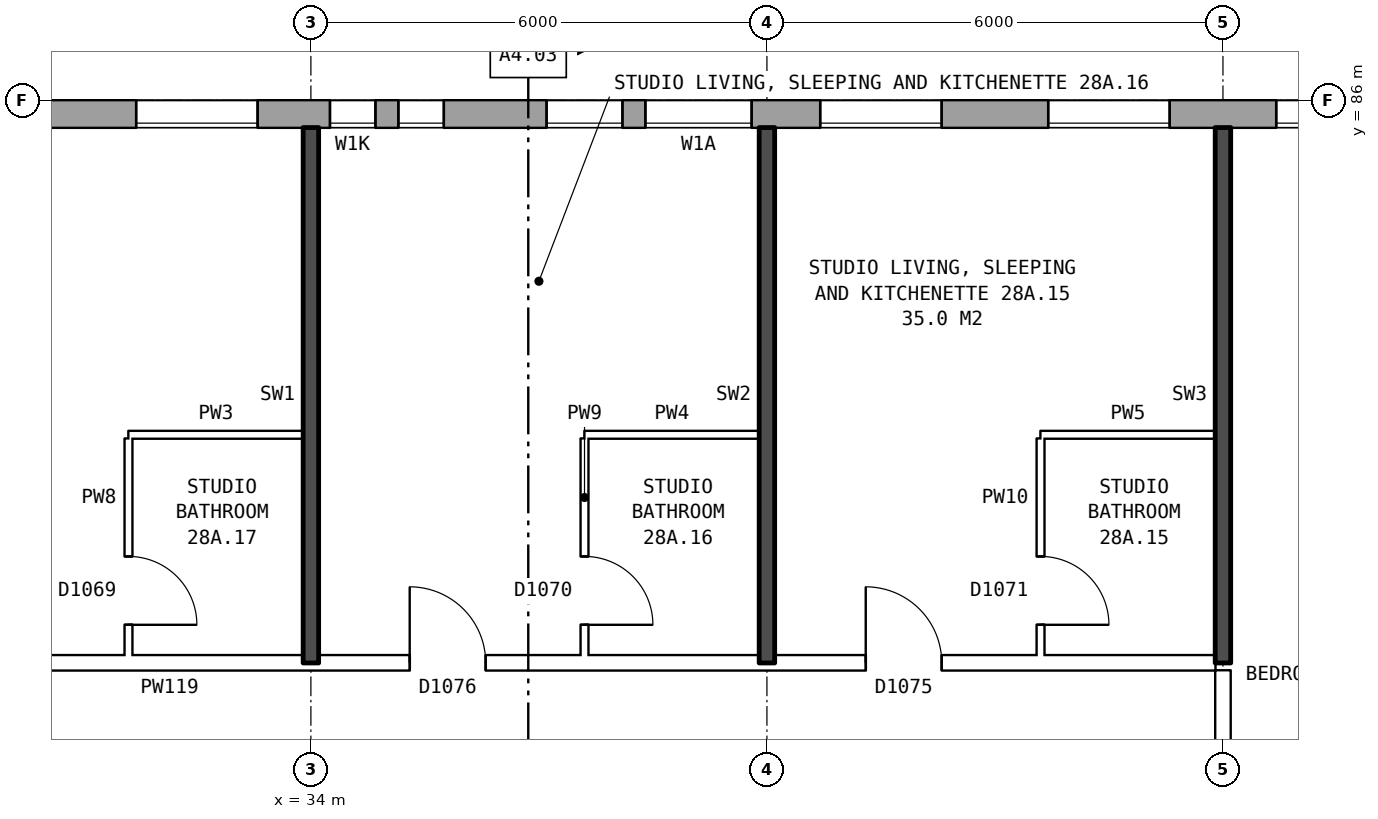
"""IFC4 building model, lengths in metres.
Left out: names, types, materials, properties, quantities, classifications, styles, units other than length and angle.
Written with IfcOpenShell. Run it as: python <this file> out.ifc"""

import sys

from ifc_helpers import new_model, si_unit, direction, frame, frame_2d, origin, place, context, subcontext, project, spatial, rectangle, extrude, element, fill, save


model = new_model("IFC4")
c1 = context("Model", 3, precision=1e-05, world=origin(), true_north=direction((0.0, 1.0)))
c2 = subcontext(c1, "Body", "Model", "MODEL_VIEW")
j1 = project(units=[si_unit("LENGTHUNIT", "METRE"), si_unit("PLANEANGLEUNIT", "RADIAN")], contexts=[c1])
p1 = place(None, origin())
s1 = spatial("IfcSite", under=j1, at=p1, CompositionType="ELEMENT")
p2 = place(p1, origin())
s2 = spatial("IfcBuilding", under=s1, at=p2, CompositionType="ELEMENT")
p3 = place(p2, frame((0.0, 0.0, 102.6)))
s3 = spatial("IfcBuildingStorey", under=s2, at=p3, CompositionType="ELEMENT", Elevation=102.6)
p4 = place(p3, frame((72.925, 85.82, 0.0), z_axis=(0.0, 0.0, 1.0), x_axis=(-1.0, 0.0, 0.0)))
e1 = element("IfcWall", 1, at=p4, inside=s3, PredefinedType="STANDARD", context=c2, shape_type="SweptSolid", body=[
    extrude(rectangle(XDim=44.851, YDim=0.36, at=frame_2d((22.425, 0.0))), origin(), (0.0, 0.0, 1.0), 2.85),
])
p5 = place(p4, frame((0.625, 0.0, 0.8)))
e2 = element("IfcOpeningElement", 2, at=p5, cuts=e1, PredefinedType="OPENING", context=c2, shape_type="SweptSolid", body=[
    extrude(rectangle(XDim=1.6, YDim=1.8, at=frame_2d((0.8, 0.9))), frame((0.0, 0.19, 0.0), z_axis=(0.0, -1.0, 0.0), x_axis=(1.0, 0.0, 0.0)), (0.0, 0.0, 1.0), 0.38),
])
p6 = place(p4, frame((3.625, 0.0, 0.8)))
e3 = element("IfcOpeningElement", 3, at=p6, cuts=e1, PredefinedType="OPENING", context=c2, shape_type="SweptSolid", body=[
    extrude(rectangle(XDim=1.6, YDim=1.8, at=frame_2d((0.8, 0.9))), frame((0.0, 0.19, 0.0), z_axis=(0.0, -1.0, 0.0), x_axis=(1.0, 0.0, 0.0)), (0.0, 0.0, 1.0), 0.38),
])
p7 = place(p4, frame((5.525, 0.0, 0.8)))
e4 = element("IfcOpeningElement", 4, at=p7, cuts=e1, PredefinedType="OPENING", context=c2, shape_type="SweptSolid", body=[
    extrude(rectangle(XDim=0.8, YDim=1.8, at=frame_2d((0.4, 0.9))), frame((0.0, 0.19, 0.0), z_axis=(0.0, -1.0, 0.0), x_axis=(1.0, 0.0, 0.0)), (0.0, 0.0, 1.0), 0.38),
])
p8 = place(p4, frame((9.125, 0.0, 0.8)))
e5 = element("IfcOpeningElement", 5, at=p8, cuts=e1, PredefinedType="OPENING", context=c2, shape_type="SweptSolid", body=[
    extrude(rectangle(XDim=0.6, YDim=0.9, at=frame_2d((0.3, 0.45))), frame((0.0, 0.19, 0.0), z_axis=(0.0, -1.0, 0.0), x_axis=(1.0, 0.0, 0.0)), (0.0, 0.0, 1.0), 0.38),
])
p9 = place(p4, frame((12.625, 0.0, 0.8)))
e6 = element("IfcOpeningElement", 6, at=p9, cuts=e1, PredefinedType="OPENING", context=c2, shape_type="SweptSolid", body=[
    extrude(rectangle(XDim=1.6, YDim=1.8, at=frame_2d((0.8, 0.9))), frame((0.0, 0.19, 0.0), z_axis=(0.0, -1.0, 0.0), x_axis=(1.0, 0.0, 0.0)), (0.0, 0.0, 1.0), 0.38),
])
p10 = place(p4, frame((15.625, 0.0, 0.8)))
e7 = element("IfcOpeningElement", 7, at=p10, cuts=e1, PredefinedType="OPENING", context=c2, shape_type="SweptSolid", body=[
    extrude(rectangle(XDim=1.6, YDim=1.8, at=frame_2d((0.8, 0.9))), frame((0.0, 0.19, 0.0), z_axis=(0.0, -1.0, 0.0), x_axis=(1.0, 0.0, 0.0)), (0.0, 0.0, 1.0), 0.38),
])
p11 = place(p4, frame((18.625, 0.0, 0.8)))
e8 = element("IfcOpeningElement", 8, at=p11, cuts=e1, PredefinedType="OPENING", context=c2, shape_type="SweptSolid", body=[
    extrude(rectangle(XDim=1.6, YDim=1.8, at=frame_2d((0.8, 0.9))), frame((0.0, 0.19, 0.0), z_axis=(0.0, -1.0, 0.0), x_axis=(1.0, 0.0, 0.0)), (0.0, 0.0, 1.0), 0.38),
])
p12 = place(p4, frame((21.625, 0.0, 0.8)))
e9 = element("IfcOpeningElement", 9, at=p12, cuts=e1, PredefinedType="OPENING", context=c2, shape_type="SweptSolid", body=[
    extrude(rectangle(XDim=1.6, YDim=1.8, at=frame_2d((0.8, 0.9))), frame((0.0, 0.19, 0.0), z_axis=(0.0, -1.0, 0.0), x_axis=(1.0, 0.0, 0.0)), (0.0, 0.0, 1.0), 0.38),
])
p13 = place(p4, frame((24.625, 0.0, 0.8)))
e10 = element("IfcOpeningElement", 10, at=p13, cuts=e1, PredefinedType="OPENING", context=c2, shape_type="SweptSolid", body=[
    extrude(rectangle(XDim=1.6, YDim=1.8, at=frame_2d((0.8, 0.9))), frame((0.0, 0.19, 0.0), z_axis=(0.0, -1.0, 0.0), x_axis=(1.0, 0.0, 0.0)), (0.0, 0.0, 1.0), 0.38),
])
p14 = place(p4, frame((27.625, 0.0, 0.8)))
e11 = element("IfcOpeningElement", 11, at=p14, cuts=e1, PredefinedType="OPENING", context=c2, shape_type="SweptSolid", body=[
    extrude(rectangle(XDim=1.6, YDim=1.8, at=frame_2d((0.8, 0.9))), frame((0.0, 0.19, 0.0), z_axis=(0.0, -1.0, 0.0), x_axis=(1.0, 0.0, 0.0)), (0.0, 0.0, 1.0), 0.38),
])
p15 = place(p4, frame((30.625, 0.0, 0.8)))
e12 = element("IfcOpeningElement", 12, at=p15, cuts=e1, PredefinedType="OPENING", context=c2, shape_type="SweptSolid", body=[
    extrude(rectangle(XDim=1.6, YDim=1.8, at=frame_2d((0.8, 0.9))), frame((0.0, 0.19, 0.0), z_axis=(0.0, -1.0, 0.0), x_axis=(1.0, 0.0, 0.0)), (0.0, 0.0, 1.0), 0.38),
])
p16 = place(p4, frame((33.125, 0.0, 0.8)))
e13 = element("IfcOpeningElement", 13, at=p16, cuts=e1, PredefinedType="OPENING", context=c2, shape_type="SweptSolid", body=[
    extrude(rectangle(XDim=1.4, YDim=1.8, at=frame_2d((0.7, 0.9))), frame((0.0, 0.19, 0.0), z_axis=(0.0, -1.0, 0.0), x_axis=(1.0, 0.0, 0.0)), (0.0, 0.0, 1.0), 0.38),
])
p17 = place(p4, frame((34.825, 0.0, 0.8)))
e14 = element("IfcOpeningElement", 14, at=p17, cuts=e1, PredefinedType="OPENING", context=c2, shape_type="SweptSolid", body=[
    extrude(rectangle(XDim=1.0, YDim=0.9, at=frame_2d((0.5, 0.45))), frame((0.0, 0.19, 0.0), z_axis=(0.0, -1.0, 0.0), x_axis=(1.0, 0.0, 0.0)), (0.0, 0.0, 1.0), 0.38),
])
p18 = place(p4, frame((39.625, 0.0, 0.8)))
e15 = element("IfcOpeningElement", 15, at=p18, cuts=e1, PredefinedType="OPENING", context=c2, shape_type="SweptSolid", body=[
    extrude(rectangle(XDim=1.6, YDim=1.8, at=frame_2d((0.8, 0.9))), frame((0.0, 0.19, 0.0), z_axis=(0.0, -1.0, 0.0), x_axis=(1.0, 0.0, 0.0)), (0.0, 0.0, 1.0), 0.38),
])
p19 = place(p4, frame((42.625, 0.0, 0.8)))
e16 = element("IfcOpeningElement", 16, at=p19, cuts=e1, PredefinedType="OPENING", context=c2, shape_type="SweptSolid", body=[
    extrude(rectangle(XDim=1.6, YDim=1.8, at=frame_2d((0.8, 0.9))), frame((0.0, 0.19, 0.0), z_axis=(0.0, -1.0, 0.0), x_axis=(1.0, 0.0, 0.0)), (0.0, 0.0, 1.0), 0.38),
])
p20 = place(p4, frame((6.625, 0.0, 1.7)))
e17 = element("IfcOpeningElement", 17, at=p20, cuts=e1, PredefinedType="OPENING", context=c2, shape_type="SweptSolid", body=[
    extrude(rectangle(XDim=1.0, YDim=0.9, at=frame_2d((0.5, 0.45))), frame((0.0, 0.19, 0.0), z_axis=(0.0, -1.0, 0.0), x_axis=(1.0, 0.0, 0.0)), (0.0, 0.0, 1.0), 0.38),
])
p21 = place(p4, frame((10.175, 0.0, 0.8)))
e18 = element("IfcOpeningElement", 18, at=p21, cuts=e1, PredefinedType="OPENING", context=c2, shape_type="SweptSolid", body=[
    extrude(rectangle(XDim=1.6, YDim=1.8, at=frame_2d((0.8, 0.9))), frame((0.0, 0.19, 0.0), z_axis=(0.0, -1.0, 0.0), x_axis=(1.0, 0.0, 0.0)), (0.0, 0.0, 1.0), 0.38),
])
p22 = place(p4, frame((37.175, 0.0, 1.7)))
e19 = element("IfcOpeningElement", 19, at=p22, cuts=e1, PredefinedType="OPENING", context=c2, shape_type="SweptSolid", body=[
    extrude(rectangle(XDim=0.6, YDim=0.9, at=frame_2d((0.3, 0.45))), frame((0.0, 0.19, 0.0), z_axis=(0.0, -1.0, 0.0), x_axis=(1.0, 0.0, 0.0)), (0.0, 0.0, 1.0), 0.38),
])
p23 = place(p4, frame((38.075, 0.0, 1.1)))
e20 = element("IfcOpeningElement", 20, at=p23, cuts=e1, PredefinedType="OPENING", context=c2, shape_type="SweptSolid", body=[
    extrude(rectangle(XDim=0.6, YDim=1.5, at=frame_2d((0.3, 0.75))), frame((0.0, 0.19, 0.0), z_axis=(0.0, -1.0, 0.0), x_axis=(1.0, 0.0, 0.0)), (0.0, 0.0, 1.0), 0.38),
])
p24 = place(p3, frame((25.36, 78.6, 0.0), z_axis=(0.0, 0.0, 1.0), x_axis=(1.0, 0.0, 0.0)))
e21 = element("IfcWall", 21, at=p24, inside=s3, PredefinedType="PARTITIONING", context=c2, shape_type="SweptSolid", body=[
    extrude(rectangle(XDim=20.54, YDim=0.2, at=frame_2d((10.27, 0.0))), origin(), (0.0, 0.0, 1.0), 2.85),
])
p25 = place(p24, frame((15.94, 0.0, 0.0)))
e22 = element("IfcOpeningElement", 22, at=p25, cuts=e21, PredefinedType="OPENING", context=c2, shape_type="SweptSolid", body=[
    extrude(rectangle(XDim=1.0, YDim=2.1, at=frame_2d((0.5, 1.05))), frame((0.0, 0.11, 0.0), z_axis=(0.0, -1.0, 0.0), x_axis=(1.0, 0.0, 0.0)), (0.0, 0.0, 1.0), 0.22),
])
p26 = place(p24, frame((9.94, 0.0, 0.0)))
e23 = element("IfcOpeningElement", 23, at=p26, cuts=e21, PredefinedType="OPENING", context=c2, shape_type="SweptSolid", body=[
    extrude(rectangle(XDim=1.0, YDim=2.1, at=frame_2d((0.5, 1.05))), frame((0.0, 0.11, 0.0), z_axis=(0.0, -1.0, 0.0), x_axis=(1.0, 0.0, 0.0)), (0.0, 0.0, 1.0), 0.22),
])
p27 = place(p24, frame((2.62, 0.0, 0.0)))
e24 = element("IfcOpeningElement", 24, at=p27, cuts=e21, PredefinedType="OPENING", context=c2, shape_type="SweptSolid", body=[
    extrude(rectangle(XDim=1.0, YDim=2.1, at=frame_2d((0.5, 1.05))), frame((0.0, 0.11, 0.0), z_axis=(0.0, -1.0, 0.0), x_axis=(1.0, 0.0, 0.0)), (0.0, 0.0, 1.0), 0.22),
])
for number, where, z_axis, x_axis in (
    (25, (31.6, 81.6, 0.0), (0.0, 0.0, 1.0), (1.0, 0.0, 0.0)),
    (26, (37.6, 81.6, 0.0), (0.0, 0.0, 1.0), (1.0, 0.0, 0.0)),
    (27, (43.6, 81.6, 0.0), (0.0, 0.0, 1.0), (1.0, 0.0, 0.0)),
):
    element("IfcWall", number, at=place(p3, frame(where, z_axis=z_axis, x_axis=x_axis)), inside=s3, PredefinedType="PARTITIONING", context=c2, shape_type="SweptSolid", body=[
        extrude(rectangle(XDim=2.3, YDim=0.1, at=frame_2d((1.15, 0.0))), origin(), (0.0, 0.0, 1.0), 2.85),
    ])
p28 = place(p3, frame((31.6, 78.7, 0.0), z_axis=(0.0, 0.0, 1.0), x_axis=(0.0, 1.0, 0.0)))
e28 = element("IfcWall", 28, at=p28, inside=s3, PredefinedType="PARTITIONING", context=c2, shape_type="SweptSolid", body=[
    extrude(rectangle(XDim=2.85, YDim=0.1, at=frame_2d((1.425, 0.0))), origin(), (0.0, 0.0, 1.0), 2.85),
])
p29 = place(p28, frame((0.4, 0.0, 0.0)))
e29 = element("IfcOpeningElement", 29, at=p29, cuts=e28, PredefinedType="OPENING", context=c2, shape_type="SweptSolid", body=[
    extrude(rectangle(XDim=0.9, YDim=2.1, at=frame_2d((0.45, 1.05))), frame((0.0, 0.06, 0.0), z_axis=(0.0, -1.0, 0.0), x_axis=(1.0, 0.0, 0.0)), (0.0, 0.0, 1.0), 0.12),
])
p30 = place(p3, frame((34.0, 78.6, 0.0), z_axis=(0.0, 0.0, 1.0), x_axis=(0.0, 1.0, 0.0)))
e30 = element("IfcWall", 30, at=p30, inside=s3, PredefinedType="SOLIDWALL", context=c2, shape_type="SweptSolid", body=[
    extrude(rectangle(XDim=7.04, YDim=0.2, at=frame_2d((3.52, 0.0))), origin(), (0.0, 0.0, 1.0), 2.85),
])
p31 = place(p3, frame((37.6, 78.7, 0.0), z_axis=(0.0, 0.0, 1.0), x_axis=(0.0, 1.0, 0.0)))
e31 = element("IfcWall", 31, at=p31, inside=s3, PredefinedType="PARTITIONING", context=c2, shape_type="SweptSolid", body=[
    extrude(rectangle(XDim=2.85, YDim=0.1, at=frame_2d((1.425, 0.0))), origin(), (0.0, 0.0, 1.0), 2.85),
])
p32 = place(p31, frame((0.4, 0.0, 0.0)))
e32 = element("IfcOpeningElement", 32, at=p32, cuts=e31, PredefinedType="OPENING", context=c2, shape_type="SweptSolid", body=[
    extrude(rectangle(XDim=0.9, YDim=2.1, at=frame_2d((0.45, 1.05))), frame((0.0, 0.06, 0.0), z_axis=(0.0, -1.0, 0.0), x_axis=(1.0, 0.0, 0.0)), (0.0, 0.0, 1.0), 0.12),
])
p33 = place(p3, frame((40.0, 78.6, 0.0), z_axis=(0.0, 0.0, 1.0), x_axis=(0.0, 1.0, 0.0)))
e33 = element("IfcWall", 33, at=p33, inside=s3, PredefinedType="SOLIDWALL", context=c2, shape_type="SweptSolid", body=[
    extrude(rectangle(XDim=7.04, YDim=0.2, at=frame_2d((3.52, 0.0))), origin(), (0.0, 0.0, 1.0), 2.85),
])
p34 = place(p3, frame((43.6, 78.7, 0.0), z_axis=(0.0, 0.0, 1.0), x_axis=(0.0, 1.0, 0.0)))
e34 = element("IfcWall", 34, at=p34, inside=s3, PredefinedType="PARTITIONING", context=c2, shape_type="SweptSolid", body=[
    extrude(rectangle(XDim=2.85, YDim=0.1, at=frame_2d((1.425, 0.0))), origin(), (0.0, 0.0, 1.0), 2.85),
])
p35 = place(p34, frame((0.4, 0.0, 0.0)))
e35 = element("IfcOpeningElement", 35, at=p35, cuts=e34, PredefinedType="OPENING", context=c2, shape_type="SweptSolid", body=[
    extrude(rectangle(XDim=0.9, YDim=2.1, at=frame_2d((0.45, 1.05))), frame((0.0, 0.06, 0.0), z_axis=(0.0, -1.0, 0.0), x_axis=(1.0, 0.0, 0.0)), (0.0, 0.0, 1.0), 0.12),
])
p36 = place(p3, frame((46.0, 76.3, 0.0), z_axis=(0.0, 0.0, 1.0), x_axis=(0.0, 1.0, 0.0)))
e36 = element("IfcWall", 36, at=p36, inside=s3, PredefinedType="PARTITIONING", context=c2, shape_type="SweptSolid", body=[
    extrude(rectangle(XDim=2.2, YDim=0.2, at=frame_2d((1.1, 0.0))), origin(), (0.0, 0.0, 1.0), 2.85),
])
p37 = place(p3, frame((46.0, 78.6, 0.0), z_axis=(0.0, 0.0, 1.0), x_axis=(0.0, 1.0, 0.0)))
e37 = element("IfcWall", 37, at=p37, inside=s3, PredefinedType="SOLIDWALL", context=c2, shape_type="SweptSolid", body=[
    extrude(rectangle(XDim=7.04, YDim=0.2, at=frame_2d((3.52, 0.0))), origin(), (0.0, 0.0, 1.0), 2.85),
])
p38 = place(p13, origin())
e38 = element("IfcWindow", 38, at=p38, inside=s3, PartitioningType="SINGLE_PANEL", PredefinedType="WINDOW", context=c2, shape_type="SweptSolid", body=[
    extrude(rectangle(XDim=1.6, YDim=1.8, at=frame_2d((0.8, 0.9))), frame((0.0, 0.15, 0.0), z_axis=(0.0, -1.0, 0.0), x_axis=(1.0, 0.0, 0.0)), (0.0, 0.0, 1.0), 0.06),
])
fill(e10, e38)
p39 = place(p14, origin())
e39 = element("IfcWindow", 39, at=p39, inside=s3, PartitioningType="SINGLE_PANEL", PredefinedType="WINDOW", context=c2, shape_type="SweptSolid", body=[
    extrude(rectangle(XDim=1.6, YDim=1.8, at=frame_2d((0.8, 0.9))), frame((0.0, 0.15, 0.0), z_axis=(0.0, -1.0, 0.0), x_axis=(1.0, 0.0, 0.0)), (0.0, 0.0, 1.0), 0.06),
])
fill(e11, e39)
p40 = place(p15, origin())
e40 = element("IfcWindow", 40, at=p40, inside=s3, PartitioningType="SINGLE_PANEL", PredefinedType="WINDOW", context=c2, shape_type="SweptSolid", body=[
    extrude(rectangle(XDim=1.6, YDim=1.8, at=frame_2d((0.8, 0.9))), frame((0.0, 0.15, 0.0), z_axis=(0.0, -1.0, 0.0), x_axis=(1.0, 0.0, 0.0)), (0.0, 0.0, 1.0), 0.06),
])
fill(e12, e40)
p41 = place(p16, origin())
e41 = element("IfcWindow", 41, at=p41, inside=s3, PartitioningType="SINGLE_PANEL", PredefinedType="WINDOW", context=c2, shape_type="SweptSolid", body=[
    extrude(rectangle(XDim=1.4, YDim=1.8, at=frame_2d((0.7, 0.9))), frame((0.0, 0.15, 0.0), z_axis=(0.0, -1.0, 0.0), x_axis=(1.0, 0.0, 0.0)), (0.0, 0.0, 1.0), 0.06),
])
fill(e13, e41)
p42 = place(p17, origin())
e42 = element("IfcWindow", 42, at=p42, inside=s3, PartitioningType="SINGLE_PANEL", PredefinedType="WINDOW", context=c2, shape_type="SweptSolid", body=[
    extrude(rectangle(XDim=1.0, YDim=0.9, at=frame_2d((0.5, 0.45))), frame((0.0, 0.15, 0.0), z_axis=(0.0, -1.0, 0.0), x_axis=(1.0, 0.0, 0.0)), (0.0, 0.0, 1.0), 0.06),
])
fill(e14, e42)
p43 = place(p18, origin())
e43 = element("IfcWindow", 43, at=p43, inside=s3, PartitioningType="SINGLE_PANEL", PredefinedType="WINDOW", context=c2, shape_type="SweptSolid", body=[
    extrude(rectangle(XDim=1.6, YDim=1.8, at=frame_2d((0.8, 0.9))), frame((0.0, 0.15, 0.0), z_axis=(0.0, -1.0, 0.0), x_axis=(1.0, 0.0, 0.0)), (0.0, 0.0, 1.0), 0.06),
])
fill(e15, e43)
p44 = place(p25, origin())
e44 = element("IfcDoor", 44, at=p44, inside=s3, OperationType="SINGLE_SWING_LEFT", PredefinedType="DOOR", context=c2, shape_type="SweptSolid", body=[
    extrude(rectangle(XDim=1.0, YDim=2.1, at=frame_2d((0.5, 1.05))), frame((0.0, 0.025, 0.0), z_axis=(0.0, -1.0, 0.0), x_axis=(1.0, 0.0, 0.0)), (0.0, 0.0, 1.0), 0.05),
])
fill(e22, e44)
p45 = place(p35, frame((0.9, 0.0, 0.0), z_axis=(0.0, 0.0, 1.0), x_axis=(-1.0, 0.0, 0.0)))
e45 = element("IfcDoor", 45, at=p45, inside=s3, OperationType="SINGLE_SWING_RIGHT", PredefinedType="DOOR", context=c2, shape_type="SweptSolid", body=[
    extrude(rectangle(XDim=0.9, YDim=2.1, at=frame_2d((0.45, 1.05))), frame((0.0, 0.025, 0.0), z_axis=(0.0, -1.0, 0.0), x_axis=(1.0, 0.0, 0.0)), (0.0, 0.0, 1.0), 0.05),
])
fill(e35, e45)
p46 = place(p26, origin())
e46 = element("IfcDoor", 46, at=p46, inside=s3, OperationType="SINGLE_SWING_LEFT", PredefinedType="DOOR", context=c2, shape_type="SweptSolid", body=[
    extrude(rectangle(XDim=1.0, YDim=2.1, at=frame_2d((0.5, 1.05))), frame((0.0, 0.025, 0.0), z_axis=(0.0, -1.0, 0.0), x_axis=(1.0, 0.0, 0.0)), (0.0, 0.0, 1.0), 0.05),
])
fill(e23, e46)
p47 = place(p32, frame((0.9, 0.0, 0.0), z_axis=(0.0, 0.0, 1.0), x_axis=(-1.0, 0.0, 0.0)))
e47 = element("IfcDoor", 47, at=p47, inside=s3, OperationType="SINGLE_SWING_RIGHT", PredefinedType="DOOR", context=c2, shape_type="SweptSolid", body=[
    extrude(rectangle(XDim=0.9, YDim=2.1, at=frame_2d((0.45, 1.05))), frame((0.0, 0.025, 0.0), z_axis=(0.0, -1.0, 0.0), x_axis=(1.0, 0.0, 0.0)), (0.0, 0.0, 1.0), 0.05),
])
fill(e32, e47)
p48 = place(p29, frame((0.9, 0.0, 0.0), z_axis=(0.0, 0.0, 1.0), x_axis=(-1.0, 0.0, 0.0)))
e48 = element("IfcDoor", 48, at=p48, inside=s3, OperationType="SINGLE_SWING_RIGHT", PredefinedType="DOOR", context=c2, shape_type="SweptSolid", body=[
    extrude(rectangle(XDim=0.9, YDim=2.1, at=frame_2d((0.45, 1.05))), frame((0.0, 0.025, 0.0), z_axis=(0.0, -1.0, 0.0), x_axis=(1.0, 0.0, 0.0)), (0.0, 0.0, 1.0), 0.05),
])
fill(e29, e48)
p49 = place(p22, origin())
e49 = element("IfcWindow", 49, at=p49, inside=s3, PartitioningType="SINGLE_PANEL", PredefinedType="WINDOW", context=c2, shape_type="SweptSolid", body=[
    extrude(rectangle(XDim=0.6, YDim=0.9, at=frame_2d((0.3, 0.45))), frame((0.0, 0.15, 0.0), z_axis=(0.0, -1.0, 0.0), x_axis=(1.0, 0.0, 0.0)), (0.0, 0.0, 1.0), 0.06),
])
fill(e19, e49)
p50 = place(p23, origin())
e50 = element("IfcWindow", 50, at=p50, inside=s3, PartitioningType="SINGLE_PANEL", PredefinedType="WINDOW", context=c2, shape_type="SweptSolid", body=[
    extrude(rectangle(XDim=0.6, YDim=1.5, at=frame_2d((0.3, 0.75))), frame((0.0, 0.15, 0.0), z_axis=(0.0, -1.0, 0.0), x_axis=(1.0, 0.0, 0.0)), (0.0, 0.0, 1.0), 0.06),
])
fill(e20, e50)
save(model, sys.argv[1])
